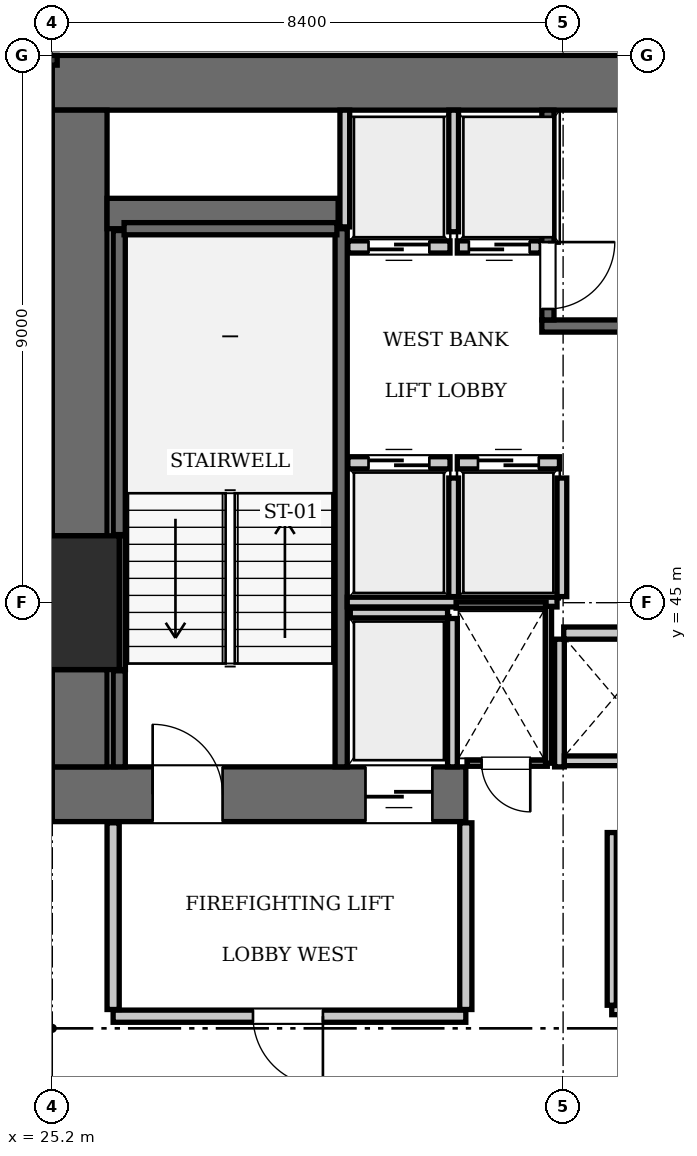
"""IFC4 building model, lengths in metres.
Left out: names, types, materials, properties, quantities, classifications, styles, units other than length and angle.
Written with IfcOpenShell. Run it as: python <this file> out.ifc"""

import sys

from ifc_helpers import new_model, si_unit, direction, frame, frame_2d, origin, origin_2d, place, context, subcontext, project, spatial, rectangle, extrude, element, fill, save


model = new_model("IFC4")
c1 = context("Model", 3, precision=1e-05, world=origin(), true_north=direction((0.0, 1.0)))
c2 = subcontext(c1, "Body", "Model", "MODEL_VIEW")
j1 = project(units=[si_unit("LENGTHUNIT", "METRE"), si_unit("PLANEANGLEUNIT", "RADIAN")], contexts=[c1])
p1 = place(None, origin())
s1 = spatial("IfcSite", under=j1, at=p1, CompositionType="ELEMENT")
p2 = place(p1, origin())
s2 = spatial("IfcBuilding", under=s1, at=p2, CompositionType="ELEMENT")
p3 = place(p2, frame((0.0, 0.0, 53.9)))
s3 = spatial("IfcBuildingStorey", under=s2, at=p3, CompositionType="ELEMENT", Elevation=53.9)
p4 = place(p3, frame((25.2, 45.0, 0.0), z_axis=(0.0, 0.0, 1.0), x_axis=(1.0, 0.0, 0.0)))
e1 = element("IfcColumn", 1, at=p4, inside=s3, PredefinedType="COLUMN", context=c2, shape_type="SweptSolid", body=[
    extrude(rectangle(XDim=2.2, YDim=2.2, at=origin_2d()), origin(), (0.0, 0.0, 1.0), 3.85),
])
p5 = place(p3, frame((25.2, 53.55, 0.0), z_axis=(0.0, 0.0, 1.0), x_axis=(1.0, 0.0, 0.0)))
e2 = element("IfcWall", 2, at=p5, inside=s3, PredefinedType="SHEAR", context=c2, shape_type="SweptSolid", body=[
    extrude(rectangle(XDim=25.2, YDim=0.9, at=frame_2d((12.6, 0.0))), origin(), (0.0, 0.0, 1.0), 3.85),
])
p6 = place(p3, frame((25.2, 41.85, 0.0), z_axis=(0.0, 0.0, 1.0), x_axis=(1.0, 0.0, 0.0)))
e3 = element("IfcWall", 3, at=p6, inside=s3, PredefinedType="SHEAR", context=c2, shape_type="SweptSolid", body=[
    extrude(rectangle(XDim=6.8, YDim=0.9, at=frame_2d((3.4, 0.0))), origin(), (0.0, 0.0, 1.0), 3.85),
])
p7 = place(p6, frame((1.65, 0.0, 0.0)))
e4 = element("IfcOpeningElement", 4, at=p7, cuts=e3, PredefinedType="OPENING", context=c2, shape_type="SweptSolid", body=[
    extrude(rectangle(XDim=1.15, YDim=2.15, at=frame_2d((0.575, 1.075))), frame((0.0, 0.46, 0.0), z_axis=(0.0, -1.0, 0.0), x_axis=(1.0, 0.0, 0.0)), (0.0, 0.0, 1.0), 0.92),
])
p8 = place(p6, frame((5.15, 0.0, 0.0)))
e5 = element("IfcOpeningElement", 5, at=p8, cuts=e3, PredefinedType="OPENING", context=c2, shape_type="SweptSolid", body=[
    extrude(rectangle(XDim=1.1, YDim=2.2, at=frame_2d((0.55, 1.1))), frame((0.0, 0.46, 0.0), z_axis=(0.0, -1.0, 0.0), x_axis=(1.0, 0.0, 0.0)), (0.0, 0.0, 1.0), 0.92),
])
p9 = place(p3, frame((25.65, 42.3, 0.0), z_axis=(0.0, 0.0, 1.0), x_axis=(0.0, 1.0, 0.0)))
e6 = element("IfcWall", 6, at=p9, inside=s3, PredefinedType="SHEAR", context=c2, shape_type="SweptSolid", body=[
    extrude(rectangle(XDim=1.6, YDim=0.9, at=frame_2d((0.8, 0.0))), origin(), (0.0, 0.0, 1.0), 3.85),
])
p10 = place(p3, frame((25.65, 46.1, 0.0), z_axis=(0.0, 0.0, 1.0), x_axis=(0.0, 1.0, 0.0)))
e7 = element("IfcWall", 7, at=p10, inside=s3, PredefinedType="SHEAR", context=c2, shape_type="SweptSolid", body=[
    extrude(rectangle(XDim=7.0, YDim=0.9, at=frame_2d((3.5, 0.0))), origin(), (0.0, 0.0, 1.0), 3.85),
])
p11 = place(p3, frame((26.1, 51.4, 0.0), z_axis=(0.0, 0.0, 1.0), x_axis=(1.0, 0.0, 0.0)))
e8 = element("IfcWall", 8, at=p11, inside=s3, PredefinedType="SHEAR", context=c2, shape_type="SweptSolid", body=[
    extrude(rectangle(XDim=3.8, YDim=0.5, at=frame_2d((1.9, 0.0))), origin(), (0.0, 0.0, 1.0), 3.85),
])
p12 = place(p3, frame((29.95, 42.3, 0.0), z_axis=(0.0, 0.0, 1.0), x_axis=(0.0, 1.0, 0.0)))
e9 = element("IfcWall", 9, at=p12, inside=s3, PredefinedType="SOLIDWALL", context=c2, shape_type="SweptSolid", body=[
    extrude(rectangle(XDim=8.85, YDim=0.2, at=frame_2d((4.425, 0.0))), origin(), (0.0, 0.0, 1.0), 3.61),
])
p13 = place(p3, frame((26.3, 42.3, 0.0), z_axis=(0.0, 0.0, 1.0), x_axis=(0.0, 1.0, 0.0)))
e10 = element("IfcWall", 10, at=p13, inside=s3, PredefinedType="SOLIDWALL", context=c2, shape_type="SweptSolid", body=[
    extrude(rectangle(XDim=1.58, YDim=0.2, at=frame_2d((0.79, 0.0))), origin(), (0.0, 0.0, 1.0), 3.61),
])
p14 = place(p3, frame((26.3, 46.12, 0.0), z_axis=(0.0, 0.0, 1.0), x_axis=(0.0, 1.0, 0.0)))
e11 = element("IfcWall", 11, at=p14, inside=s3, PredefinedType="SOLIDWALL", context=c2, shape_type="SweptSolid", body=[
    extrude(rectangle(XDim=5.0, YDim=0.2, at=frame_2d((2.5, 0.0))), origin(), (0.0, 0.0, 1.0), 3.61),
])
p15 = place(p3, frame((26.38, 51.15, 0.0), z_axis=(0.0, 0.0, 1.0), x_axis=(1.0, 0.0, 0.0)))
e12 = element("IfcWall", 12, at=p15, inside=s3, PredefinedType="SOLIDWALL", context=c2, shape_type="SweptSolid", body=[
    extrude(rectangle(XDim=3.5, YDim=0.2, at=frame_2d((1.75, 0.0))), origin(), (0.0, 0.0, 1.0), 3.61),
])
p16 = place(p3, frame((26.352, 43.9, 0.0), z_axis=(0.0, 0.0, 1.0), x_axis=(0.0, 1.0, 0.0)))
e13 = element("IfcWall", 13, at=p16, inside=s3, PredefinedType="SOLIDWALL", context=c2, shape_type="SweptSolid", body=[
    extrude(rectangle(XDim=2.2, YDim=0.1, at=frame_2d((1.1, 0.0))), origin(), (0.0, 0.0, 1.0), 3.61),
])
p17 = place(p3, frame((33.25, 49.55, 0.0), z_axis=(0.0, 0.0, 1.0), x_axis=(1.0, 0.0, 0.0)))
e14 = element("IfcWall", 14, at=p17, inside=s3, PredefinedType="SOLIDWALL", context=c2, shape_type="SweptSolid", body=[
    extrude(rectangle(XDim=9.1, YDim=0.2, at=frame_2d((4.55, 0.0))), origin(), (0.0, 0.0, 1.0), 3.61),
])
p18 = place(p3, frame((33.35, 49.65, 0.0), z_axis=(0.0, 0.0, 1.0), x_axis=(0.0, 1.0, 0.0)))
e15 = element("IfcWall", 15, at=p18, inside=s3, PredefinedType="SOLIDWALL", context=c2, shape_type="SweptSolid", body=[
    extrude(rectangle(XDim=3.45, YDim=0.2, at=frame_2d((1.725, 0.0))), origin(), (0.0, 0.0, 1.0), 3.61),
])
p19 = place(p18, frame((0.18, 0.0, 0.0)))
e16 = element("IfcOpeningElement", 16, at=p19, cuts=e15, PredefinedType="OPENING", context=c2, shape_type="SweptSolid", body=[
    extrude(rectangle(XDim=1.1, YDim=2.15, at=frame_2d((0.55, 1.075))), frame((0.0, 0.11, 0.0), z_axis=(0.0, -1.0, 0.0), x_axis=(1.0, 0.0, 0.0)), (0.0, 0.0, 1.0), 0.22),
])
p20 = place(p3, frame((30.06, 47.3, 0.0), z_axis=(0.0, 0.0, 1.0), x_axis=(1.0, 0.0, 0.0)))
e17 = element("IfcWall", 17, at=p20, inside=s3, PredefinedType="SOLIDWALL", context=c2, shape_type="SweptSolid", body=[
    extrude(rectangle(XDim=1.68, YDim=0.2, at=frame_2d((0.84, 0.0))), origin(), (0.0, 0.0, 1.0), 3.61),
])
p21 = place(p20, frame((0.34, 0.0, 0.0)))
e18 = element("IfcOpeningElement", 18, at=p21, cuts=e17, PredefinedType="OPENING", context=c2, shape_type="SweptSolid", body=[
    extrude(rectangle(XDim=1.0, YDim=2.15, at=frame_2d((0.5, 1.075))), frame((0.0, 0.11, 0.0), z_axis=(0.0, -1.0, 0.0), x_axis=(1.0, 0.0, 0.0)), (0.0, 0.0, 1.0), 0.22),
])
p22 = place(p3, frame((31.86, 47.3, 0.0), z_axis=(0.0, 0.0, 1.0), x_axis=(1.0, 0.0, 0.0)))
e19 = element("IfcWall", 19, at=p22, inside=s3, PredefinedType="SOLIDWALL", context=c2, shape_type="SweptSolid", body=[
    extrude(rectangle(XDim=1.68, YDim=0.2, at=frame_2d((0.84, 0.0))), origin(), (0.0, 0.0, 1.0), 3.61),
])
p23 = place(p22, frame((0.34, 0.0, 0.0)))
e20 = element("IfcOpeningElement", 20, at=p23, cuts=e19, PredefinedType="OPENING", context=c2, shape_type="SweptSolid", body=[
    extrude(rectangle(XDim=1.0, YDim=2.15, at=frame_2d((0.5, 1.075))), frame((0.0, 0.11, 0.0), z_axis=(0.0, -1.0, 0.0), x_axis=(1.0, 0.0, 0.0)), (0.0, 0.0, 1.0), 0.22),
])
p24 = place(p3, frame((30.06, 50.85, 0.0), z_axis=(0.0, 0.0, 1.0), x_axis=(1.0, 0.0, 0.0)))
e21 = element("IfcWall", 21, at=p24, inside=s3, PredefinedType="SOLIDWALL", context=c2, shape_type="SweptSolid", body=[
    extrude(rectangle(XDim=1.68, YDim=0.2, at=frame_2d((0.84, 0.0))), origin(), (0.0, 0.0, 1.0), 3.61),
])
p25 = place(p24, frame((0.34, 0.0, 0.0)))
e22 = element("IfcOpeningElement", 22, at=p25, cuts=e21, PredefinedType="OPENING", context=c2, shape_type="SweptSolid", body=[
    extrude(rectangle(XDim=1.0, YDim=2.15, at=frame_2d((0.5, 1.075))), frame((0.0, 0.11, 0.0), z_axis=(0.0, -1.0, 0.0), x_axis=(1.0, 0.0, 0.0)), (0.0, 0.0, 1.0), 0.22),
])
p26 = place(p3, frame((31.86, 50.85, 0.0), z_axis=(0.0, 0.0, 1.0), x_axis=(1.0, 0.0, 0.0)))
e23 = element("IfcWall", 23, at=p26, inside=s3, PredefinedType="SOLIDWALL", context=c2, shape_type="SweptSolid", body=[
    extrude(rectangle(XDim=1.38, YDim=0.2, at=frame_2d((0.69, 0.0))), origin(), (0.0, 0.0, 1.0), 3.61),
])
p27 = place(p26, frame((0.19, 0.0, 0.0)))
e24 = element("IfcOpeningElement", 24, at=p27, cuts=e23, PredefinedType="OPENING", context=c2, shape_type="SweptSolid", body=[
    extrude(rectangle(XDim=1.0, YDim=2.15, at=frame_2d((0.5, 1.075))), frame((0.0, 0.11, 0.0), z_axis=(0.0, -1.0, 0.0), x_axis=(1.0, 0.0, 0.0)), (0.0, 0.0, 1.0), 0.22),
])
p28 = place(p3, frame((33.61, 44.5, 0.0), z_axis=(0.0, 0.0, 1.0), x_axis=(1.0, 0.0, 0.0)))
e25 = element("IfcWall", 25, at=p28, inside=s3, PredefinedType="SOLIDWALL", context=c2, shape_type="SweptSolid", body=[
    extrude(rectangle(XDim=1.68, YDim=0.2, at=frame_2d((0.84, 0.0))), origin(), (0.0, 0.0, 1.0), 3.61),
])
p29 = place(p3, frame((30.1, 44.83, 0.0), z_axis=(0.0, 0.0, 1.0), x_axis=(1.0, 0.0, 0.0)))
e26 = element("IfcWall", 26, at=p29, inside=s3, PredefinedType="SOLIDWALL", context=c2, shape_type="SweptSolid", body=[
    extrude(rectangle(XDim=1.6, YDim=0.16, at=frame_2d((0.8, 0.0))), origin(), (0.0, 0.0, 1.0), 3.61),
])
p30 = place(p3, frame((31.78, 42.3, 0.0), z_axis=(0.0, 0.0, 1.0), x_axis=(0.0, 1.0, 0.0)))
e27 = element("IfcWall", 27, at=p30, inside=s3, PredefinedType="SOLIDWALL", context=c2, shape_type="SweptSolid", body=[
    extrude(rectangle(XDim=2.44, YDim=0.16, at=frame_2d((1.22, 0.0))), origin(), (0.0, 0.0, 1.0), 3.61),
])
for number, where, z_axis, x_axis in (
    (28, (31.8, 45.1, 0.0), (0.0, 0.0, 1.0), (0.0, 1.0, 0.0)),
    (29, (33.58, 45.1, 0.0), (0.0, 0.0, 1.0), (0.0, 1.0, 0.0)),
):
    element("IfcWall", number, at=place(p3, frame(where, z_axis=z_axis, x_axis=x_axis)), inside=s3, PredefinedType="SOLIDWALL", context=c2, shape_type="SweptSolid", body=[
        extrude(rectangle(XDim=1.95, YDim=0.16, at=frame_2d((0.975, 0.0))), origin(), (0.0, 0.0, 1.0), 3.61),
    ])
p31 = place(p3, frame((30.05, 45.01, 0.0), z_axis=(0.0, 0.0, 1.0), x_axis=(1.0, 0.0, 0.0)))
e30 = element("IfcWall", 30, at=p31, inside=s3, PredefinedType="SOLIDWALL", context=c2, shape_type="SweptSolid", body=[
    extrude(rectangle(XDim=3.45, YDim=0.16, at=frame_2d((1.725, 0.0))), origin(), (0.0, 0.0, 1.0), 3.61),
])
p32 = place(p3, frame((30.01, 51.18, 0.0), z_axis=(0.0, 0.0, 1.0), x_axis=(0.0, 1.0, 0.0)))
e31 = element("IfcWall", 31, at=p32, inside=s3, PredefinedType="SOLIDWALL", context=c2, shape_type="SweptSolid", body=[
    extrude(rectangle(XDim=1.92, YDim=0.16, at=frame_2d((0.96, 0.0))), origin(), (0.0, 0.0, 1.0), 3.61),
])
p33 = place(p3, frame((31.8, 51.1, 0.0), z_axis=(0.0, 0.0, 1.0), x_axis=(0.0, 1.0, 0.0)))
e32 = element("IfcWall", 32, at=p33, inside=s3, PredefinedType="SOLIDWALL", context=c2, shape_type="SweptSolid", body=[
    extrude(rectangle(XDim=2.0, YDim=0.16, at=frame_2d((1.0, 0.0))), origin(), (0.0, 0.0, 1.0), 3.61),
])
p34 = place(p3, frame((33.54, 42.3, 0.0), z_axis=(0.0, 0.0, 1.0), x_axis=(0.0, 1.0, 0.0)))
e33 = element("IfcWall", 33, at=p34, inside=s3, PredefinedType="SOLIDWALL", context=c2, shape_type="SweptSolid", body=[
    extrude(rectangle(XDim=2.1, YDim=0.16, at=frame_2d((1.05, 0.0))), origin(), (0.0, 0.0, 1.0), 3.61),
])
p35 = place(p3, frame((33.62, 42.4, 0.0), z_axis=(0.0, 0.0, 1.0), x_axis=(1.0, 0.0, 0.0)))
e34 = element("IfcWall", 34, at=p35, inside=s3, PredefinedType="SOLIDWALL", context=c2, shape_type="SweptSolid", body=[
    extrude(rectangle(XDim=1.66, YDim=0.16, at=frame_2d((0.83, 0.0))), origin(), (0.0, 0.0, 1.0), 3.61),
])
p36 = place(p3, frame((26.2, 38.2, 0.0), z_axis=(0.0, 0.0, 1.0), x_axis=(1.0, 0.0, 0.0)))
e35 = element("IfcWall", 35, at=p36, inside=s3, PredefinedType="PARTITIONING", context=c2, shape_type="SweptSolid", body=[
    extrude(rectangle(XDim=5.8, YDim=0.2, at=frame_2d((2.9, 0.0))), origin(), (0.0, 0.0, 1.0), 3.61),
])
p37 = place(p36, frame((2.3, 0.0, 0.0)))
e36 = element("IfcOpeningElement", 36, at=p37, cuts=e35, PredefinedType="OPENING", context=c2, shape_type="SweptSolid", body=[
    extrude(rectangle(XDim=1.15, YDim=2.15, at=frame_2d((0.575, 1.075))), frame((0.0, 0.11, 0.0), z_axis=(0.0, -1.0, 0.0), x_axis=(1.0, 0.0, 0.0)), (0.0, 0.0, 1.0), 0.22),
])
for number, where, z_axis, x_axis in (
    (37, (26.2, 38.31, 0.0), (0.0, 0.0, 1.0), (0.0, 1.0, 0.0)),
    (38, (32.0, 38.31, 0.0), (0.0, 0.0, 1.0), (0.0, 1.0, 0.0)),
):
    element("IfcWall", number, at=place(p3, frame(where, z_axis=z_axis, x_axis=x_axis)), inside=s3, PredefinedType="PARTITIONING", context=c2, shape_type="SweptSolid", body=[
        extrude(rectangle(XDim=3.07, YDim=0.2, at=frame_2d((1.535, 0.0))), origin(), (0.0, 0.0, 1.0), 3.61),
    ])
p38 = place(p3, frame((32.02, 42.36, 0.0), z_axis=(0.0, 0.0, 1.0), x_axis=(1.0, 0.0, 0.0)))
e39 = element("IfcWall", 39, at=p38, inside=s3, PredefinedType="PARTITIONING", context=c2, shape_type="SweptSolid", body=[
    extrude(rectangle(XDim=1.32, YDim=0.1, at=frame_2d((0.66, 0.0))), origin(), (0.0, 0.0, 1.0), 3.61),
])
p39 = place(p38, frame((0.24, 0.0, 0.0)))
e40 = element("IfcOpeningElement", 40, at=p39, cuts=e39, PredefinedType="OPENING", context=c2, shape_type="SweptSolid", body=[
    extrude(rectangle(XDim=0.8, YDim=2.05, at=frame_2d((0.4, 1.025))), frame((0.0, 0.06, 0.0), z_axis=(0.0, -1.0, 0.0), x_axis=(1.0, 0.0, 0.0)), (0.0, 0.0, 1.0), 0.12),
])
p40 = place(p3, frame((31.84, 44.96, 0.0), z_axis=(0.0, 0.0, 1.0), x_axis=(1.0, 0.0, 0.0)))
e41 = element("IfcWall", 41, at=p40, inside=s3, PredefinedType="PARTITIONING", context=c2, shape_type="SweptSolid", body=[
    extrude(rectangle(XDim=1.48, YDim=0.1, at=frame_2d((0.74, 0.0))), origin(), (0.0, 0.0, 1.0), 3.61),
])
p41 = place(p3, frame((33.36, 42.36, 0.0), z_axis=(0.0, 0.0, 1.0), x_axis=(0.0, 1.0, 0.0)))
e42 = element("IfcWall", 42, at=p41, inside=s3, PredefinedType="PARTITIONING", context=c2, shape_type="SweptSolid", body=[
    extrude(rectangle(XDim=2.58, YDim=0.1, at=frame_2d((1.29, 0.0))), origin(), (0.0, 0.0, 1.0), 3.61),
])
p42 = place(p3, frame((34.4, 38.3, 0.0), z_axis=(0.0, 0.0, 1.0), x_axis=(1.0, 0.0, 0.0)))
e43 = element("IfcWall", 43, at=p42, inside=s3, PredefinedType="PARTITIONING", context=c2, shape_type="SweptSolid", body=[
    extrude(rectangle(XDim=5.92, YDim=0.15, at=frame_2d((2.96, 0.0))), origin(), (0.0, 0.0, 1.0), 3.61),
])
p43 = place(p42, frame((2.4, 0.0, 0.0)))
e44 = element("IfcOpeningElement", 44, at=p43, cuts=e43, PredefinedType="OPENING", context=c2, shape_type="SweptSolid", body=[
    extrude(rectangle(XDim=0.9, YDim=2.1, at=frame_2d((0.45, 1.05))), frame((0.0, 0.085, 0.0), z_axis=(0.0, -1.0, 0.0), x_axis=(1.0, 0.0, 0.0)), (0.0, 0.0, 1.0), 0.17),
])
p44 = place(p3, frame((34.4, 38.38, 0.0), z_axis=(0.0, 0.0, 1.0), x_axis=(0.0, 1.0, 0.0)))
e45 = element("IfcWall", 45, at=p44, inside=s3, PredefinedType="PARTITIONING", context=c2, shape_type="SweptSolid", body=[
    extrude(rectangle(XDim=2.84, YDim=0.15, at=frame_2d((1.42, 0.0))), origin(), (0.0, 0.0, 1.0), 3.61),
])
p45 = place(p7, origin())
e46 = element("IfcDoor", 46, at=p45, inside=s3, OperationType="SINGLE_SWING_LEFT", PredefinedType="DOOR", context=c2, shape_type="SweptSolid", body=[
    extrude(rectangle(XDim=1.15, YDim=2.15, at=frame_2d((0.575, 1.075))), frame((0.0, 0.025, 0.0), z_axis=(0.0, -1.0, 0.0), x_axis=(1.0, 0.0, 0.0)), (0.0, 0.0, 1.0), 0.05),
])
fill(e4, e46)
p46 = place(p19, frame((1.1, 0.0, 0.0), z_axis=(0.0, 0.0, 1.0), x_axis=(-1.0, 0.0, 0.0)))
e47 = element("IfcDoor", 47, at=p46, inside=s3, OperationType="SINGLE_SWING_LEFT", PredefinedType="DOOR", context=c2, shape_type="SweptSolid", body=[
    extrude(rectangle(XDim=1.1, YDim=2.15, at=frame_2d((0.55, 1.075))), frame((0.0, 0.025, 0.0), z_axis=(0.0, -1.0, 0.0), x_axis=(1.0, 0.0, 0.0)), (0.0, 0.0, 1.0), 0.05),
])
fill(e16, e47)
p47 = place(p21, origin())
e48 = element("IfcDoor", 48, at=p47, inside=s3, OperationType="SLIDING_TO_LEFT", PredefinedType="DOOR", context=c2, shape_type="SweptSolid", body=[
    extrude(rectangle(XDim=1.0, YDim=2.15, at=frame_2d((0.5, 1.075))), frame((0.0, 0.025, 0.0), z_axis=(0.0, -1.0, 0.0), x_axis=(1.0, 0.0, 0.0)), (0.0, 0.0, 1.0), 0.05),
])
fill(e18, e48)
p48 = place(p23, origin())
e49 = element("IfcDoor", 49, at=p48, inside=s3, OperationType="SLIDING_TO_LEFT", PredefinedType="DOOR", context=c2, shape_type="SweptSolid", body=[
    extrude(rectangle(XDim=1.0, YDim=2.15, at=frame_2d((0.5, 1.075))), frame((0.0, 0.025, 0.0), z_axis=(0.0, -1.0, 0.0), x_axis=(1.0, 0.0, 0.0)), (0.0, 0.0, 1.0), 0.05),
])
fill(e20, e49)
p49 = place(p25, frame((1.0, 0.0, 0.0), z_axis=(0.0, 0.0, 1.0), x_axis=(-1.0, 0.0, 0.0)))
e50 = element("IfcDoor", 50, at=p49, inside=s3, OperationType="SLIDING_TO_LEFT", PredefinedType="DOOR", context=c2, shape_type="SweptSolid", body=[
    extrude(rectangle(XDim=1.0, YDim=2.15, at=frame_2d((0.5, 1.075))), frame((0.0, 0.025, 0.0), z_axis=(0.0, -1.0, 0.0), x_axis=(1.0, 0.0, 0.0)), (0.0, 0.0, 1.0), 0.05),
])
fill(e22, e50)
p50 = place(p27, frame((1.0, 0.0, 0.0), z_axis=(0.0, 0.0, 1.0), x_axis=(-1.0, 0.0, 0.0)))
e51 = element("IfcDoor", 51, at=p50, inside=s3, OperationType="SLIDING_TO_LEFT", PredefinedType="DOOR", context=c2, shape_type="SweptSolid", body=[
    extrude(rectangle(XDim=1.0, YDim=2.15, at=frame_2d((0.5, 1.075))), frame((0.0, 0.025, 0.0), z_axis=(0.0, -1.0, 0.0), x_axis=(1.0, 0.0, 0.0)), (0.0, 0.0, 1.0), 0.05),
])
fill(e24, e51)
p51 = place(p8, frame((1.1, 0.0, 0.0), z_axis=(0.0, 0.0, 1.0), x_axis=(-1.0, 0.0, 0.0)))
e52 = element("IfcDoor", 52, at=p51, inside=s3, OperationType="SLIDING_TO_LEFT", PredefinedType="DOOR", context=c2, shape_type="SweptSolid", body=[
    extrude(rectangle(XDim=1.1, YDim=2.2, at=frame_2d((0.55, 1.1))), frame((0.0, 0.025, 0.0), z_axis=(0.0, -1.0, 0.0), x_axis=(1.0, 0.0, 0.0)), (0.0, 0.0, 1.0), 0.05),
])
fill(e5, e52)
p52 = place(p37, frame((1.15, 0.0, 0.0), z_axis=(0.0, 0.0, 1.0), x_axis=(-1.0, 0.0, 0.0)))
e53 = element("IfcDoor", 53, at=p52, inside=s3, OperationType="SINGLE_SWING_LEFT", PredefinedType="DOOR", context=c2, shape_type="SweptSolid", body=[
    extrude(rectangle(XDim=1.15, YDim=2.15, at=frame_2d((0.575, 1.075))), frame((0.0, 0.025, 0.0), z_axis=(0.0, -1.0, 0.0), x_axis=(1.0, 0.0, 0.0)), (0.0, 0.0, 1.0), 0.05),
])
fill(e36, e53)
p53 = place(p39, frame((0.8, 0.0, 0.0), z_axis=(0.0, 0.0, 1.0), x_axis=(-1.0, 0.0, 0.0)))
e54 = element("IfcDoor", 54, at=p53, inside=s3, OperationType="SINGLE_SWING_LEFT", PredefinedType="DOOR", context=c2, shape_type="SweptSolid", body=[
    extrude(rectangle(XDim=0.8, YDim=2.05, at=frame_2d((0.4, 1.025))), frame((0.0, 0.025, 0.0), z_axis=(0.0, -1.0, 0.0), x_axis=(1.0, 0.0, 0.0)), (0.0, 0.0, 1.0), 0.05),
])
fill(e40, e54)
save(model, sys.argv[1])
